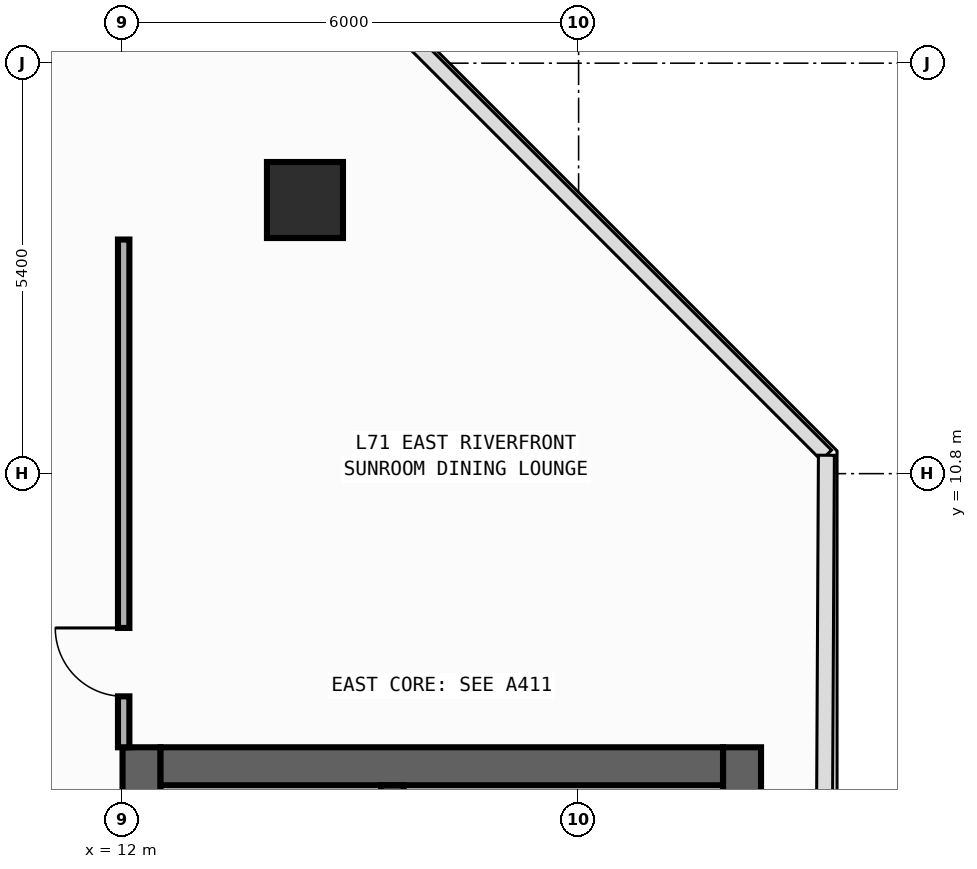
"""IFC4 building model, lengths in metres.
Left out: names, types, materials, properties, quantities, classifications, styles, units other than length and angle.
Written with IfcOpenShell. Run it as: python <this file> out.ifc"""

import sys

from ifc_helpers import new_model, si_unit, direction, frame, frame_2d, origin, origin_2d, place, context, subcontext, project, spatial, rectangle, circle, extrude, element, fill, save


model = new_model("IFC4")
c1 = context("Model", 3, precision=1e-05, world=origin(), true_north=direction((0.0, 1.0)))
c2 = subcontext(c1, "Body", "Model", "MODEL_VIEW")
j1 = project(units=[si_unit("LENGTHUNIT", "METRE"), si_unit("PLANEANGLEUNIT", "RADIAN")], contexts=[c1])
p1 = place(None, origin())
s1 = spatial("IfcSite", under=j1, at=p1, CompositionType="ELEMENT")
p2 = place(p1, origin())
s2 = spatial("IfcBuilding", under=s1, at=p2, CompositionType="ELEMENT")
p3 = place(p2, frame((0.0, 0.0, 296.6)))
s3 = spatial("IfcBuildingStorey", under=s2, at=p3, CompositionType="ELEMENT", Elevation=296.6)
p4 = place(p3, frame((12.25, -19.8, 0.0), z_axis=(0.0, 0.0, 1.0), x_axis=(0.0, 1.0, 0.0)))
e1 = element("IfcWall", 1, at=p4, inside=s3, PredefinedType="SHEAR", context=c2, shape_type="SweptSolid", body=[
    extrude(rectangle(XDim=27.0, YDim=0.5, at=frame_2d((13.5, 0.0))), origin(), (0.0, 0.0, 1.0), 3.54),
])
p5 = place(p4, frame((23.05, 0.0, 0.0)))
e2 = element("IfcOpeningElement", 2, at=p5, cuts=e1, PredefinedType="OPENING", context=c2, shape_type="SweptSolid", body=[
    extrude(rectangle(XDim=1.1, YDim=2.2, at=frame_2d((0.55, 1.1))), frame((0.0, 0.26, 0.0), z_axis=(0.0, -1.0, 0.0), x_axis=(1.0, 0.0, 0.0)), (0.0, 0.0, 1.0), 0.52),
])
p6 = place(p4, frame((19.85, 0.0, 0.0)))
e3 = element("IfcOpeningElement", 3, at=p6, cuts=e1, PredefinedType="OPENING", context=c2, shape_type="SweptSolid", body=[
    extrude(rectangle(XDim=1.1, YDim=2.2, at=frame_2d((0.55, 1.1))), frame((0.0, 0.26, 0.0), z_axis=(0.0, -1.0, 0.0), x_axis=(1.0, 0.0, 0.0)), (0.0, 0.0, 1.0), 0.52),
])
p7 = place(p4, frame((16.65, 0.0, 0.0)))
e4 = element("IfcOpeningElement", 4, at=p7, cuts=e1, PredefinedType="OPENING", context=c2, shape_type="SweptSolid", body=[
    extrude(rectangle(XDim=1.1, YDim=2.2, at=frame_2d((0.55, 1.1))), frame((0.0, 0.26, 0.0), z_axis=(0.0, -1.0, 0.0), x_axis=(1.0, 0.0, 0.0)), (0.0, 0.0, 1.0), 0.52),
])
p8 = place(p4, frame((10.175, 0.0, 0.0)))
e5 = element("IfcOpeningElement", 5, at=p8, cuts=e1, PredefinedType="OPENING", context=c2, shape_type="SweptSolid", body=[
    extrude(rectangle(XDim=0.85, YDim=2.1, at=frame_2d((0.425, 1.05))), frame((0.0, 0.26, 0.0), z_axis=(0.0, -1.0, 0.0), x_axis=(1.0, 0.0, 0.0)), (0.0, 0.0, 1.0), 0.52),
])
p9 = place(p4, frame((12.725, 0.0, 0.0)))
e6 = element("IfcOpeningElement", 6, at=p9, cuts=e1, PredefinedType="OPENING", context=c2, shape_type="SweptSolid", body=[
    extrude(rectangle(XDim=1.15, YDim=2.2, at=frame_2d((0.575, 1.1))), frame((0.0, 0.26, 0.0), z_axis=(0.0, -1.0, 0.0), x_axis=(1.0, 0.0, 0.0)), (0.0, 0.0, 1.0), 0.52),
])
p10 = place(p4, frame((25.125, 0.0, 0.0)))
e7 = element("IfcOpeningElement", 7, at=p10, cuts=e1, PredefinedType="OPENING", context=c2, shape_type="SweptSolid", body=[
    extrude(rectangle(XDim=0.85, YDim=2.1, at=frame_2d((0.425, 1.05))), frame((0.0, 0.26, 0.0), z_axis=(0.0, -1.0, 0.0), x_axis=(1.0, 0.0, 0.0)), (0.0, 0.0, 1.0), 0.52),
])
p11 = place(p3, frame((20.15, -19.8, 0.0), z_axis=(0.0, 0.0, 1.0), x_axis=(0.0, 1.0, 0.0)))
e8 = element("IfcWall", 8, at=p11, inside=s3, PredefinedType="SHEAR", context=c2, shape_type="SweptSolid", body=[
    extrude(rectangle(XDim=27.0, YDim=0.5, at=frame_2d((13.5, 0.0))), origin(), (0.0, 0.0, 1.0), 3.54),
])
p12 = place(p3, frame((12.5, 6.95, 0.0), z_axis=(0.0, 0.0, 1.0), x_axis=(1.0, 0.0, 0.0)))
e9 = element("IfcWall", 9, at=p12, inside=s3, PredefinedType="SHEAR", context=c2, shape_type="SweptSolid", body=[
    extrude(rectangle(XDim=7.4, YDim=0.5, at=frame_2d((3.7, 0.0))), origin(), (0.0, 0.0, 1.0), 3.54),
])
p13 = place(p3, frame((15.55, -19.3, 0.0), z_axis=(0.0, 0.0, 1.0), x_axis=(0.0, 1.0, 0.0)))
e10 = element("IfcWall", 10, at=p13, inside=s3, PredefinedType="SHEAR", context=c2, shape_type="SweptSolid", body=[
    extrude(rectangle(XDim=26.0, YDim=0.3, at=frame_2d((13.0, 0.0))), origin(), (0.0, 0.0, 1.0), 3.54),
])
p14 = place(p13, frame((12.225, 0.0, 0.0)))
e11 = element("IfcOpeningElement", 11, at=p14, cuts=e10, PredefinedType="OPENING", context=c2, shape_type="SweptSolid", body=[
    extrude(rectangle(XDim=1.15, YDim=2.2, at=frame_2d((0.575, 1.1))), frame((0.0, 0.16, 0.0), z_axis=(0.0, -1.0, 0.0), x_axis=(1.0, 0.0, 0.0)), (0.0, 0.0, 1.0), 0.32),
])
p15 = place(p13, frame((24.625, 0.0, 0.0)))
e12 = element("IfcOpeningElement", 12, at=p15, cuts=e10, PredefinedType="OPENING", context=c2, shape_type="SweptSolid", body=[
    extrude(rectangle(XDim=0.85, YDim=2.1, at=frame_2d((0.425, 1.05))), frame((0.0, 0.16, 0.0), z_axis=(0.0, -1.0, 0.0), x_axis=(1.0, 0.0, 0.0)), (0.0, 0.0, 1.0), 0.32),
])
p16 = place(p3, frame((14.4, 14.4, 0.0), z_axis=(0.0, 0.0, 1.0), x_axis=(1.0, 0.0, 0.0)))
e13 = element("IfcColumn", 13, at=p16, inside=s3, PredefinedType="COLUMN", context=c2, shape_type="SweptSolid", body=[
    extrude(circle(Radius=0.5, at=origin_2d()), origin(), (0.0, 0.0, 1.0), 3.8),
])
p17 = place(p3, frame((12.015, 7.2, 0.0), z_axis=(0.0, 0.0, 1.0), x_axis=(0.0, 1.0, 0.0)))
e14 = element("IfcWall", 14, at=p17, inside=s3, PredefinedType="PARTITIONING", context=c2, shape_type="SweptSolid", body=[
    extrude(rectangle(XDim=6.68, YDim=0.15, at=frame_2d((3.34, 0.0))), origin(), (0.0, 0.0, 1.0), 3.54),
])
p18 = place(p17, frame((0.67, 0.0, 0.0)))
e15 = element("IfcOpeningElement", 15, at=p18, cuts=e14, PredefinedType="OPENING", context=c2, shape_type="SweptSolid", body=[
    extrude(rectangle(XDim=0.9, YDim=2.15, at=frame_2d((0.45, 1.075))), frame((0.0, 0.085, 0.0), z_axis=(0.0, -1.0, 0.0), x_axis=(1.0, 0.0, 0.0)), (0.0, 0.0, 1.0), 0.17),
])
p19 = place(p18, origin())
e16 = element("IfcDoor", 16, at=p19, inside=s3, OperationType="SINGLE_SWING_RIGHT", PredefinedType="DOOR", context=c2, shape_type="SweptSolid", body=[
    extrude(rectangle(XDim=0.9, YDim=2.15, at=frame_2d((0.45, 1.075))), frame((0.0, 0.025, 0.0), z_axis=(0.0, -1.0, 0.0), x_axis=(1.0, 0.0, 0.0)), (0.0, 0.0, 1.0), 0.05),
])
fill(e15, e16)
save(model, sys.argv[1])
